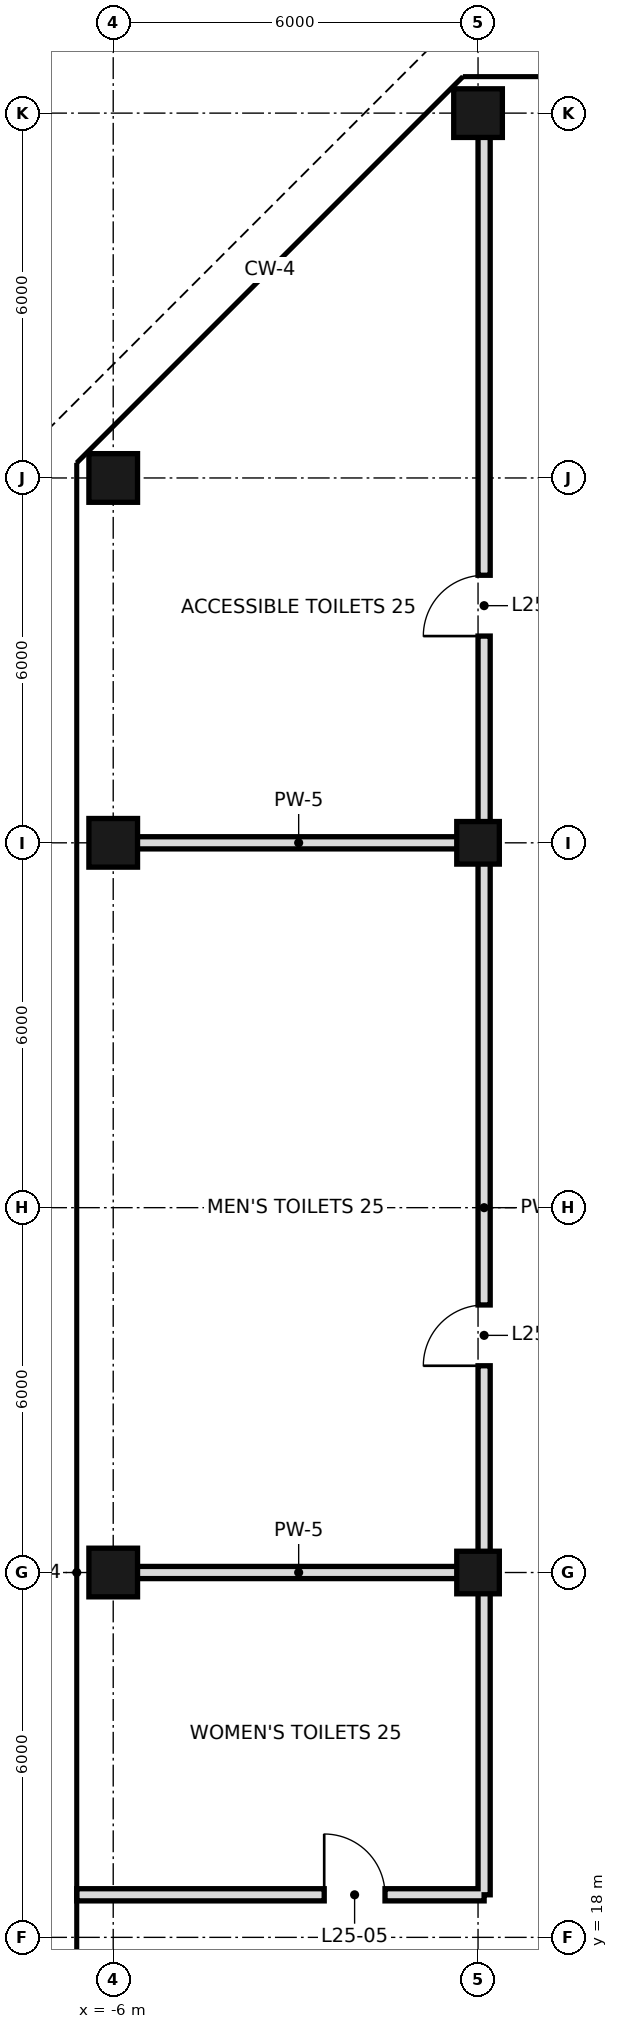
"""IFC4 building model, lengths in metres.
Left out: names, types, materials, properties, quantities, classifications, styles, units other than length and angle.
Written with IfcOpenShell. Run it as: python <this file> out.ifc"""

import sys

from ifc_helpers import new_model, si_unit, direction, frame, frame_2d, origin, origin_2d, place, context, subcontext, project, spatial, rectangle, hollow_rectangle, extrude, element, fill, save


model = new_model("IFC4")
c1 = context("Model", 3, precision=1e-05, world=origin(), true_north=direction((0.0, 1.0)))
c2 = subcontext(c1, "Body", "Model", "MODEL_VIEW")
j1 = project(units=[si_unit("LENGTHUNIT", "METRE"), si_unit("PLANEANGLEUNIT", "RADIAN")], contexts=[c1])
p1 = place(None, origin())
s1 = spatial("IfcSite", under=j1, at=p1, CompositionType="ELEMENT")
p2 = place(p1, origin())
s2 = spatial("IfcBuilding", under=s1, at=p2, CompositionType="ELEMENT")
p3 = place(p2, frame((0.0, 0.0, 114.2)))
s3 = spatial("IfcBuildingStorey", under=s2, at=p3, CompositionType="ELEMENT", Elevation=114.2)
for number, where, z_axis, x_axis in (
    (1, (-6.0, 24.0, 0.0), (0.0, 0.0, 1.0), (1.0, 0.0, 0.0)),
    (2, (-6.0, 36.0, 0.0), (0.0, 0.0, 1.0), (1.0, 0.0, 0.0)),
    (3, (-6.0, 42.0, 0.0), (0.0, 0.0, 1.0), (1.0, 0.0, 0.0)),
):
    element("IfcColumn", number, at=place(p3, frame(where, z_axis=z_axis, x_axis=x_axis)), inside=s3, PredefinedType="COLUMN", context=c2, shape_type="SweptSolid", body=[
        extrude(hollow_rectangle(XDim=0.8, YDim=0.8, WallThickness=0.04, at=origin_2d()), origin(), (0.0, 0.0, 1.0), 5.4),
    ])
for number, where, z_axis, x_axis in (
    (4, (0.0, 24.0, 0.0), (0.0, 0.0, 1.0), (1.0, 0.0, 0.0)),
    (5, (0.0, 36.0, 0.0), (0.0, 0.0, 1.0), (1.0, 0.0, 0.0)),
):
    element("IfcColumn", number, at=place(p3, frame(where, z_axis=z_axis, x_axis=x_axis)), inside=s3, PredefinedType="COLUMN", context=c2, shape_type="SweptSolid", body=[
        extrude(hollow_rectangle(XDim=0.7, YDim=0.7, WallThickness=0.036, at=origin_2d()), origin(), (0.0, 0.0, 1.0), 5.4),
    ])
p4 = place(p3, frame((0.0, 48.0, 0.0), z_axis=(0.0, 0.0, 1.0), x_axis=(1.0, 0.0, 0.0)))
e6 = element("IfcColumn", 6, at=p4, inside=s3, PredefinedType="COLUMN", context=c2, shape_type="SweptSolid", body=[
    extrude(hollow_rectangle(XDim=0.8, YDim=0.8, WallThickness=0.04, at=origin_2d()), origin(), (0.0, 0.0, 1.0), 5.4),
])
p5 = place(p3, frame((0.1, 18.7, 0.0), z_axis=(0.0, 0.0, 1.0), x_axis=(0.0, 1.0, 0.0)))
e7 = element("IfcWall", 7, at=p5, inside=s3, PredefinedType="SOLIDWALL", context=c2, shape_type="SweptSolid", body=[
    extrude(rectangle(XDim=29.3, YDim=0.2, at=frame_2d((14.65, 0.0))), origin(), (0.0, 0.0, 1.0), 4.52),
])
p6 = place(p5, frame((8.7, 0.0, 0.0)))
e8 = element("IfcOpeningElement", 8, at=p6, cuts=e7, PredefinedType="OPENING", context=c2, shape_type="SweptSolid", body=[
    extrude(rectangle(XDim=1.0, YDim=2.4, at=frame_2d((0.5, 1.2))), frame((0.0, 0.11, 0.0), z_axis=(0.0, -1.0, 0.0), x_axis=(1.0, 0.0, 0.0)), (0.0, 0.0, 1.0), 0.22),
])
p7 = place(p5, frame((20.7, 0.0, 0.0)))
e9 = element("IfcOpeningElement", 9, at=p7, cuts=e7, PredefinedType="OPENING", context=c2, shape_type="SweptSolid", body=[
    extrude(rectangle(XDim=1.0, YDim=2.4, at=frame_2d((0.5, 1.2))), frame((0.0, 0.11, 0.0), z_axis=(0.0, -1.0, 0.0), x_axis=(1.0, 0.0, 0.0)), (0.0, 0.0, 1.0), 0.22),
])
p8 = place(p3, frame((-6.6, 18.7, 0.0), z_axis=(0.0, 0.0, 1.0), x_axis=(1.0, 0.0, 0.0)))
e10 = element("IfcWall", 10, at=p8, inside=s3, PredefinedType="SOLIDWALL", context=c2, shape_type="SweptSolid", body=[
    extrude(rectangle(XDim=6.7, YDim=0.2, at=frame_2d((3.35, 0.0))), origin(), (0.0, 0.0, 1.0), 4.52),
])
p9 = place(p8, frame((4.07, 0.0, 0.0)))
e11 = element("IfcOpeningElement", 11, at=p9, cuts=e10, PredefinedType="OPENING", context=c2, shape_type="SweptSolid", body=[
    extrude(rectangle(XDim=1.0, YDim=2.4, at=frame_2d((0.5, 1.2))), frame((0.0, 0.11, 0.0), z_axis=(0.0, -1.0, 0.0), x_axis=(1.0, 0.0, 0.0)), (0.0, 0.0, 1.0), 0.22),
])
for number, where, z_axis, x_axis in (
    (12, (-6.0, 24.0, 0.0), (0.0, 0.0, 1.0), (1.0, 0.0, 0.0)),
    (13, (-6.0, 36.0, 0.0), (0.0, 0.0, 1.0), (1.0, 0.0, 0.0)),
):
    element("IfcWall", number, at=place(p3, frame(where, z_axis=z_axis, x_axis=x_axis)), inside=s3, PredefinedType="SOLIDWALL", context=c2, shape_type="SweptSolid", body=[
        extrude(rectangle(XDim=6.1, YDim=0.2, at=frame_2d((3.05, 0.0))), origin(), (0.0, 0.0, 1.0), 4.77),
    ])
p10 = place(p9, origin())
e14 = element("IfcDoor", 14, at=p10, inside=s3, OperationType="SINGLE_SWING_LEFT", PredefinedType="DOOR", context=c2, shape_type="SweptSolid", body=[
    extrude(rectangle(XDim=1.0, YDim=2.4, at=frame_2d((0.5, 1.2))), frame((0.0, 0.025, 0.0), z_axis=(0.0, -1.0, 0.0), x_axis=(1.0, 0.0, 0.0)), (0.0, 0.0, 1.0), 0.05),
])
fill(e11, e14)
p11 = place(p6, origin())
e15 = element("IfcDoor", 15, at=p11, inside=s3, OperationType="SINGLE_SWING_LEFT", PredefinedType="DOOR", context=c2, shape_type="SweptSolid", body=[
    extrude(rectangle(XDim=1.0, YDim=2.4, at=frame_2d((0.5, 1.2))), frame((0.0, 0.025, 0.0), z_axis=(0.0, -1.0, 0.0), x_axis=(1.0, 0.0, 0.0)), (0.0, 0.0, 1.0), 0.05),
])
fill(e8, e15)
p12 = place(p7, origin())
e16 = element("IfcDoor", 16, at=p12, inside=s3, OperationType="SINGLE_SWING_LEFT", PredefinedType="DOOR", context=c2, shape_type="SweptSolid", body=[
    extrude(rectangle(XDim=1.0, YDim=2.4, at=frame_2d((0.5, 1.2))), frame((0.0, 0.025, 0.0), z_axis=(0.0, -1.0, 0.0), x_axis=(1.0, 0.0, 0.0)), (0.0, 0.0, 1.0), 0.05),
])
fill(e9, e16)
save(model, sys.argv[1])
